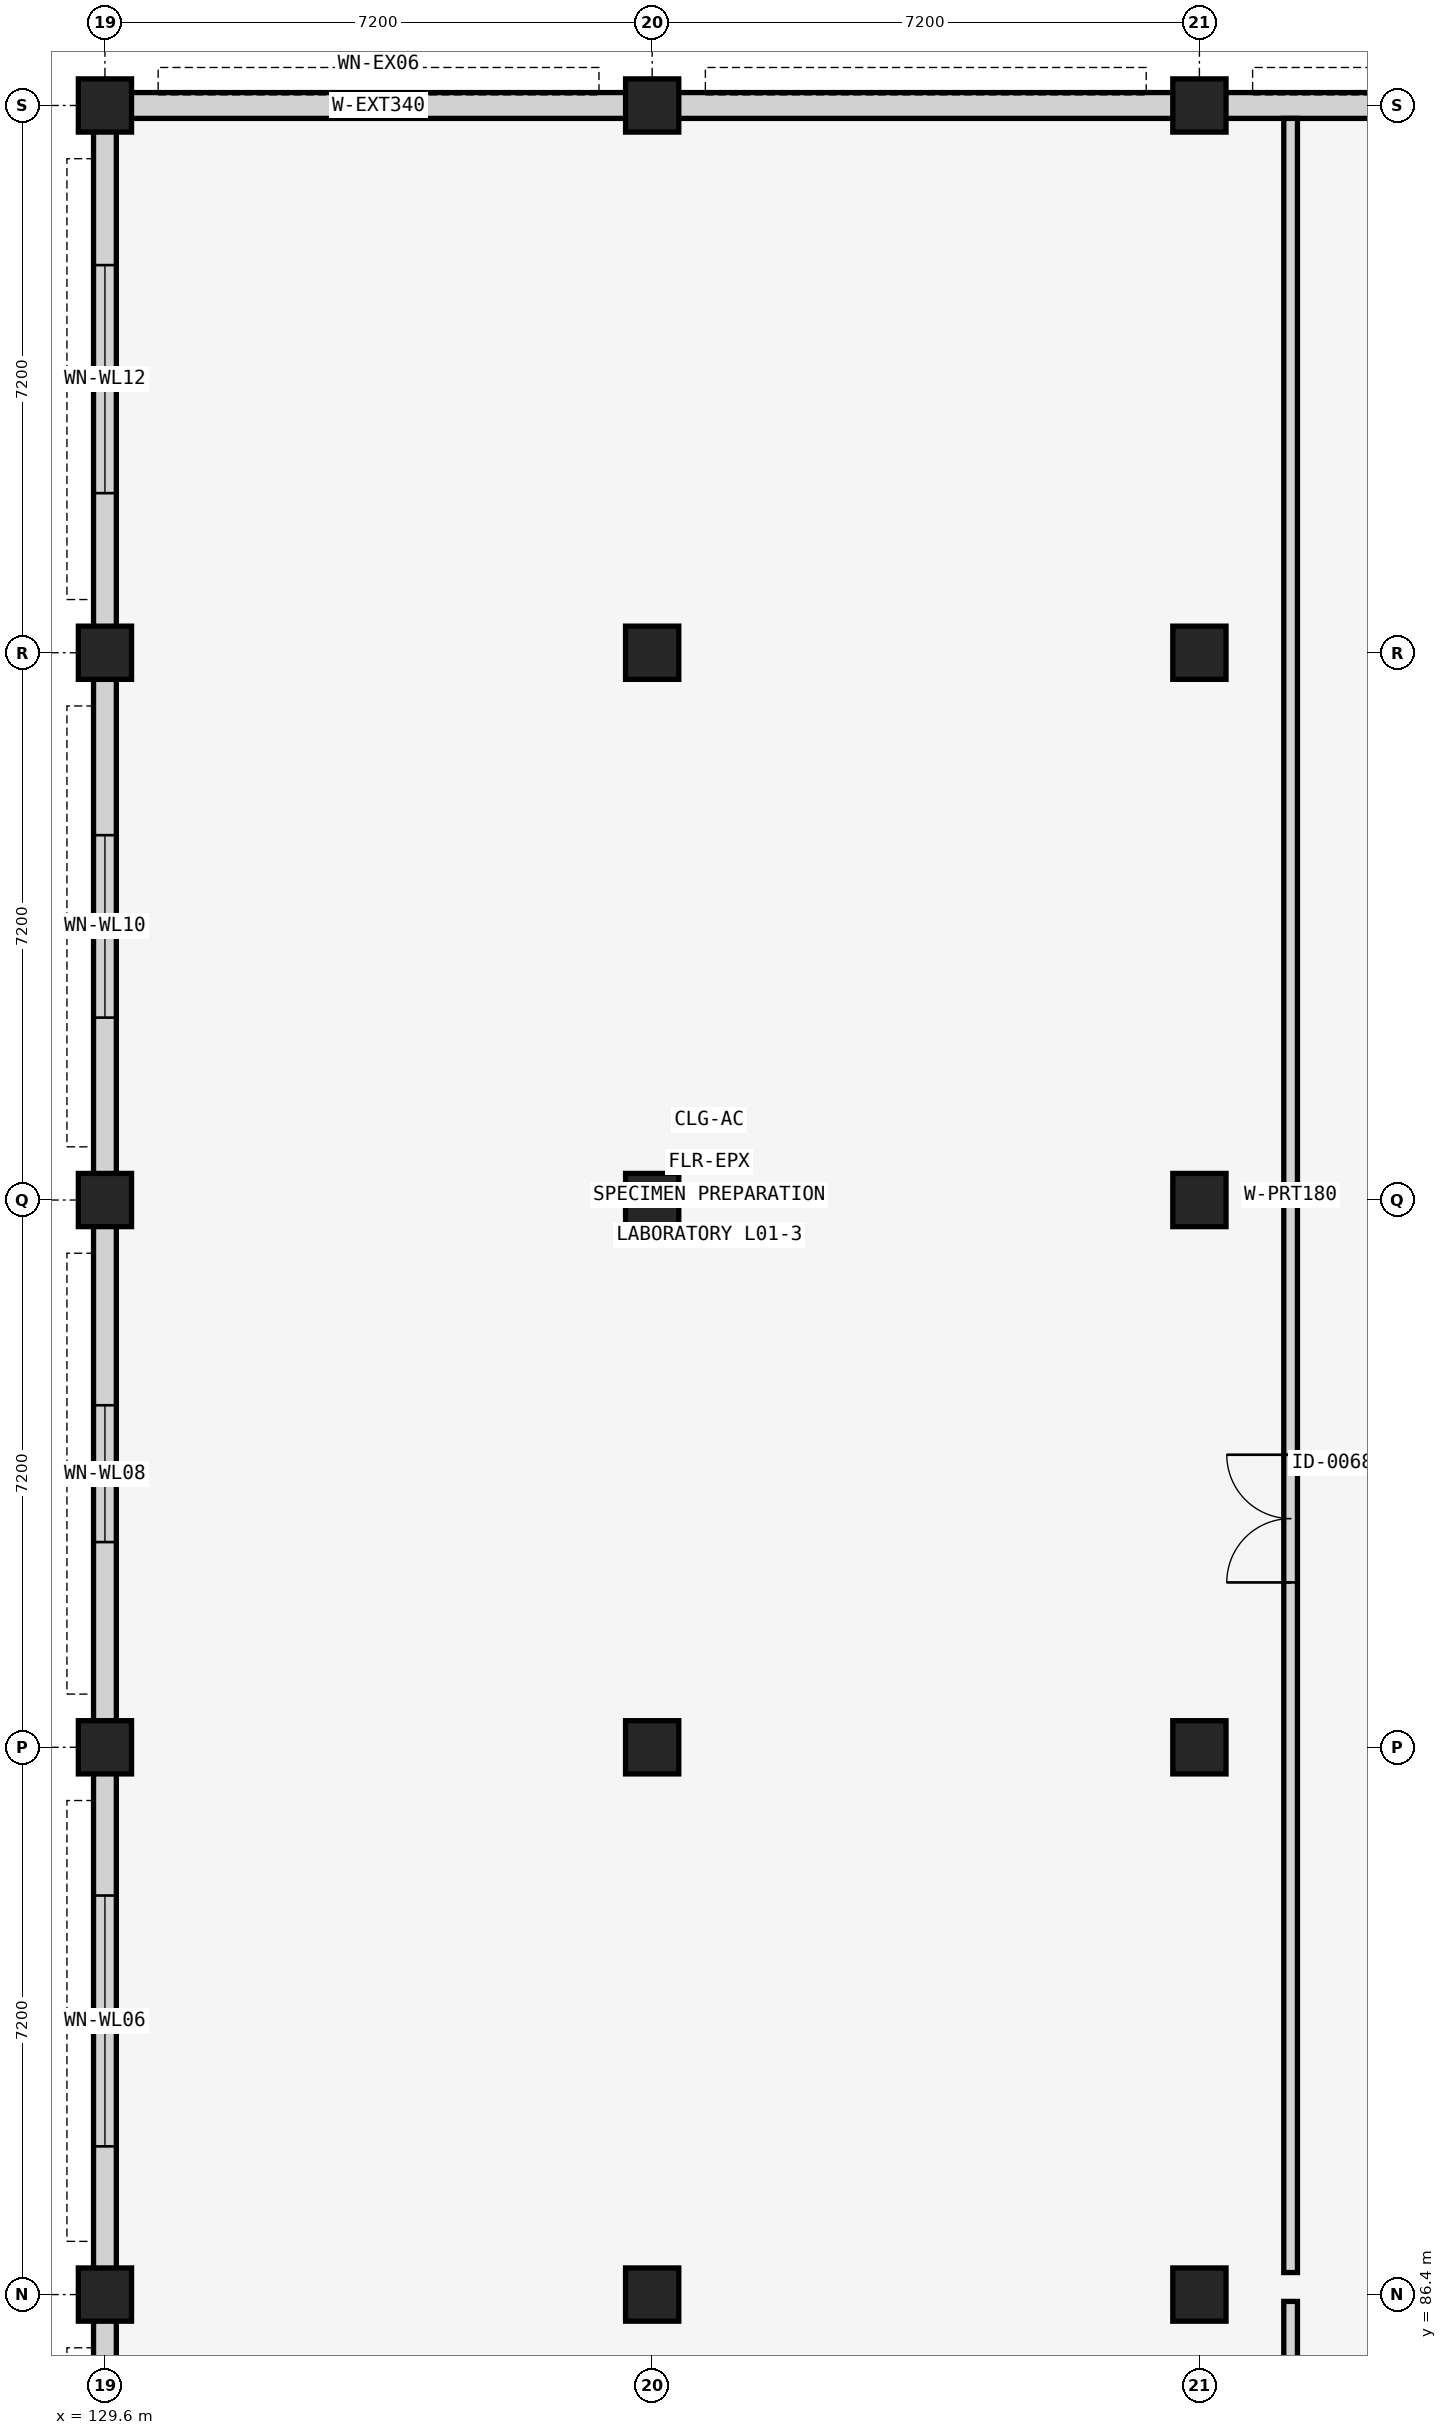
"""IFC4 building model, lengths in metres.
Left out: names, types, materials, properties, quantities, classifications, styles, units other than length and angle.
Written with IfcOpenShell. Run it as: python <this file> out.ifc"""

import sys

from ifc_helpers import new_model, si_unit, direction, frame, frame_2d, origin, origin_2d, place, context, subcontext, project, spatial, rectangle, extrude, element, fill, save


model = new_model("IFC4")
c1 = context("Model", 3, precision=1e-05, world=origin(), true_north=direction((0.0, 1.0)))
c2 = subcontext(c1, "Body", "Model", "MODEL_VIEW")
j1 = project(units=[si_unit("LENGTHUNIT", "METRE"), si_unit("PLANEANGLEUNIT", "RADIAN")], contexts=[c1])
p1 = place(None, origin())
s1 = spatial("IfcSite", under=j1, at=p1, CompositionType="ELEMENT")
p2 = place(p1, origin())
s2 = spatial("IfcBuilding", under=s1, at=p2, CompositionType="ELEMENT")
p3 = place(p2, frame((0.0, 0.0, 4.8)))
s3 = spatial("IfcBuildingStorey", under=s2, at=p3, CompositionType="ELEMENT", Elevation=4.8)
for number, where, z_axis, x_axis in (
    (1, (129.6, 86.4, 0.0), (0.0, 0.0, 1.0), (1.0, 0.0, 0.0)),
    (2, (129.6, 93.6, 0.0), (0.0, 0.0, 1.0), (1.0, 0.0, 0.0)),
    (3, (129.6, 100.8, 0.0), (0.0, 0.0, 1.0), (1.0, 0.0, 0.0)),
    (4, (129.6, 108.0, 0.0), (0.0, 0.0, 1.0), (1.0, 0.0, 0.0)),
    (5, (129.6, 115.2, 0.0), (0.0, 0.0, 1.0), (1.0, 0.0, 0.0)),
    (6, (136.8, 86.4, 0.0), (0.0, 0.0, 1.0), (1.0, 0.0, 0.0)),
    (7, (136.8, 93.6, 0.0), (0.0, 0.0, 1.0), (1.0, 0.0, 0.0)),
    (8, (136.8, 100.8, 0.0), (0.0, 0.0, 1.0), (1.0, 0.0, 0.0)),
    (9, (136.8, 108.0, 0.0), (0.0, 0.0, 1.0), (1.0, 0.0, 0.0)),
    (10, (136.8, 115.2, 0.0), (0.0, 0.0, 1.0), (1.0, 0.0, 0.0)),
    (11, (144.0, 86.4, 0.0), (0.0, 0.0, 1.0), (1.0, 0.0, 0.0)),
    (12, (144.0, 93.6, 0.0), (0.0, 0.0, 1.0), (1.0, 0.0, 0.0)),
    (13, (144.0, 100.8, 0.0), (0.0, 0.0, 1.0), (1.0, 0.0, 0.0)),
    (14, (144.0, 108.0, 0.0), (0.0, 0.0, 1.0), (1.0, 0.0, 0.0)),
    (15, (144.0, 115.2, 0.0), (0.0, 0.0, 1.0), (1.0, 0.0, 0.0)),
):
    element("IfcColumn", number, at=place(p3, frame(where, z_axis=z_axis, x_axis=x_axis)), inside=s3, PredefinedType="COLUMN", context=c2, shape_type="SweptSolid", body=[
        extrude(rectangle(XDim=0.7, YDim=0.7, at=origin_2d()), origin(), (0.0, 0.0, 1.0), 4.16),
    ])
p4 = place(p3, frame((129.94, 115.2, 0.0), z_axis=(0.0, 0.0, 1.0), x_axis=(1.0, 0.0, 0.0)))
e16 = element("IfcWall", 16, at=p4, inside=s3, PredefinedType="SOLIDWALL", context=c2, shape_type="SweptSolid", body=[
    extrude(rectangle(XDim=6.52, YDim=0.34, at=frame_2d((3.26, 0.0))), origin(), (0.0, 0.0, 1.0), 3.21),
])
p5 = place(p4, frame((2.685, 0.0, 0.95)))
e17 = element("IfcOpeningElement", 17, at=p5, cuts=e16, PredefinedType="OPENING", context=c2, shape_type="SweptSolid", body=[
    extrude(rectangle(XDim=1.15, YDim=2.0, at=frame_2d((0.575, 1.0))), frame((0.0, 0.18, 0.0), z_axis=(0.0, -1.0, 0.0), x_axis=(1.0, 0.0, 0.0)), (0.0, 0.0, 1.0), 0.36),
])
p6 = place(p3, frame((137.14, 115.2, 0.0), z_axis=(0.0, 0.0, 1.0), x_axis=(1.0, 0.0, 0.0)))
e18 = element("IfcWall", 18, at=p6, inside=s3, PredefinedType="SOLIDWALL", context=c2, shape_type="SweptSolid", body=[
    extrude(rectangle(XDim=6.52, YDim=0.34, at=frame_2d((3.26, 0.0))), origin(), (0.0, 0.0, 1.0), 3.21),
])
p7 = place(p3, frame((144.34, 115.2, 0.0), z_axis=(0.0, 0.0, 1.0), x_axis=(1.0, 0.0, 0.0)))
e19 = element("IfcWall", 19, at=p7, inside=s3, PredefinedType="SOLIDWALL", context=c2, shape_type="SweptSolid", body=[
    extrude(rectangle(XDim=6.52, YDim=0.34, at=frame_2d((3.26, 0.0))), origin(), (0.0, 0.0, 1.0), 3.21),
])
p8 = place(p7, frame((2.535, 0.0, 0.95)))
e20 = element("IfcOpeningElement", 20, at=p8, cuts=e19, PredefinedType="OPENING", context=c2, shape_type="SweptSolid", body=[
    extrude(rectangle(XDim=1.45, YDim=2.0, at=frame_2d((0.725, 1.0))), frame((0.0, 0.18, 0.0), z_axis=(0.0, -1.0, 0.0), x_axis=(1.0, 0.0, 0.0)), (0.0, 0.0, 1.0), 0.36),
])
p9 = place(p3, frame((129.6, 79.54, 0.0), z_axis=(0.0, 0.0, 1.0), x_axis=(0.0, 1.0, 0.0)))
e21 = element("IfcWall", 21, at=p9, inside=s3, PredefinedType="SOLIDWALL", context=c2, shape_type="SweptSolid", body=[
    extrude(rectangle(XDim=6.52, YDim=0.3, at=frame_2d((3.26, 0.0))), origin(), (0.0, 0.0, 1.0), 3.11),
])
p10 = place(p9, frame((1.91, 0.0, 0.85)))
e22 = element("IfcOpeningElement", 22, at=p10, cuts=e21, PredefinedType="OPENING", context=c2, shape_type="SweptSolid", body=[
    extrude(rectangle(XDim=2.7, YDim=2.1, at=frame_2d((1.35, 1.05))), frame((0.0, 0.16, 0.0), z_axis=(0.0, -1.0, 0.0), x_axis=(1.0, 0.0, 0.0)), (0.0, 0.0, 1.0), 0.32),
])
p11 = place(p3, frame((129.6, 86.74, 0.0), z_axis=(0.0, 0.0, 1.0), x_axis=(0.0, 1.0, 0.0)))
e23 = element("IfcWall", 23, at=p11, inside=s3, PredefinedType="SOLIDWALL", context=c2, shape_type="SweptSolid", body=[
    extrude(rectangle(XDim=6.52, YDim=0.3, at=frame_2d((3.26, 0.0))), origin(), (0.0, 0.0, 1.0), 3.11),
])
p12 = place(p11, frame((1.61, 0.0, 0.85)))
e24 = element("IfcOpeningElement", 24, at=p12, cuts=e23, PredefinedType="OPENING", context=c2, shape_type="SweptSolid", body=[
    extrude(rectangle(XDim=3.3, YDim=2.1, at=frame_2d((1.65, 1.05))), frame((0.0, 0.16, 0.0), z_axis=(0.0, -1.0, 0.0), x_axis=(1.0, 0.0, 0.0)), (0.0, 0.0, 1.0), 0.32),
])
p13 = place(p3, frame((129.6, 93.94, 0.0), z_axis=(0.0, 0.0, 1.0), x_axis=(0.0, 1.0, 0.0)))
e25 = element("IfcWall", 25, at=p13, inside=s3, PredefinedType="SOLIDWALL", context=c2, shape_type="SweptSolid", body=[
    extrude(rectangle(XDim=6.52, YDim=0.3, at=frame_2d((3.26, 0.0))), origin(), (0.0, 0.0, 1.0), 3.11),
])
p14 = place(p13, frame((2.36, 0.0, 0.95)))
e26 = element("IfcOpeningElement", 26, at=p14, cuts=e25, PredefinedType="OPENING", context=c2, shape_type="SweptSolid", body=[
    extrude(rectangle(XDim=1.8, YDim=1.8, at=frame_2d((0.9, 0.9))), frame((0.0, 0.16, 0.0), z_axis=(0.0, -1.0, 0.0), x_axis=(1.0, 0.0, 0.0)), (0.0, 0.0, 1.0), 0.32),
])
p15 = place(p3, frame((129.6, 101.14, 0.0), z_axis=(0.0, 0.0, 1.0), x_axis=(0.0, 1.0, 0.0)))
e27 = element("IfcWall", 27, at=p15, inside=s3, PredefinedType="SOLIDWALL", context=c2, shape_type="SweptSolid", body=[
    extrude(rectangle(XDim=6.52, YDim=0.3, at=frame_2d((3.26, 0.0))), origin(), (0.0, 0.0, 1.0), 3.11),
])
p16 = place(p15, frame((2.06, 0.0, 0.95)))
e28 = element("IfcOpeningElement", 28, at=p16, cuts=e27, PredefinedType="OPENING", context=c2, shape_type="SweptSolid", body=[
    extrude(rectangle(XDim=2.4, YDim=1.8, at=frame_2d((1.2, 0.9))), frame((0.0, 0.16, 0.0), z_axis=(0.0, -1.0, 0.0), x_axis=(1.0, 0.0, 0.0)), (0.0, 0.0, 1.0), 0.32),
])
p17 = place(p3, frame((129.6, 108.34, 0.0), z_axis=(0.0, 0.0, 1.0), x_axis=(0.0, 1.0, 0.0)))
e29 = element("IfcWall", 29, at=p17, inside=s3, PredefinedType="SOLIDWALL", context=c2, shape_type="SweptSolid", body=[
    extrude(rectangle(XDim=6.52, YDim=0.3, at=frame_2d((3.26, 0.0))), origin(), (0.0, 0.0, 1.0), 3.11),
])
p18 = place(p17, frame((1.76, 0.0, 0.95)))
e30 = element("IfcOpeningElement", 30, at=p18, cuts=e29, PredefinedType="OPENING", context=c2, shape_type="SweptSolid", body=[
    extrude(rectangle(XDim=3.0, YDim=1.8, at=frame_2d((1.5, 0.9))), frame((0.0, 0.16, 0.0), z_axis=(0.0, -1.0, 0.0), x_axis=(1.0, 0.0, 0.0)), (0.0, 0.0, 1.0), 0.32),
])
p19 = place(p3, frame((145.2, 65.09, 0.0), z_axis=(0.0, 0.0, 1.0), x_axis=(0.0, 1.0, 0.0)))
e31 = element("IfcWall", 31, at=p19, inside=s3, PredefinedType="PARTITIONING", context=c2, shape_type="SweptSolid", body=[
    extrude(rectangle(XDim=21.22, YDim=0.18, at=frame_2d((10.61, 0.0))), origin(), (0.0, 0.0, 1.0), 3.11),
])
p20 = place(p19, frame((9.795, 0.0, 0.0)))
e32 = element("IfcOpeningElement", 32, at=p20, cuts=e31, PredefinedType="OPENING", context=c2, shape_type="SweptSolid", body=[
    extrude(rectangle(XDim=1.63, YDim=2.22, at=frame_2d((0.815, 1.11))), frame((0.0, 0.1, 0.0), z_axis=(0.0, -1.0, 0.0), x_axis=(1.0, 0.0, 0.0)), (0.0, 0.0, 1.0), 0.2),
])
p21 = place(p3, frame((145.2, 86.69, 0.0), z_axis=(0.0, 0.0, 1.0), x_axis=(0.0, 1.0, 0.0)))
e33 = element("IfcWall", 33, at=p21, inside=s3, PredefinedType="PARTITIONING", context=c2, shape_type="SweptSolid", body=[
    extrude(rectangle(XDim=28.34, YDim=0.18, at=frame_2d((14.17, 0.0))), origin(), (0.0, 0.0, 1.0), 3.11),
])
p22 = place(p21, frame((9.079, 0.0, 0.0)))
e34 = element("IfcOpeningElement", 34, at=p22, cuts=e33, PredefinedType="OPENING", context=c2, shape_type="SweptSolid", body=[
    extrude(rectangle(XDim=1.68, YDim=2.22, at=frame_2d((0.84, 1.11))), frame((0.0, 0.1, 0.0), z_axis=(0.0, -1.0, 0.0), x_axis=(1.0, 0.0, 0.0)), (0.0, 0.0, 1.0), 0.2),
])
p23 = place(p5, origin())
e35 = element("IfcWindow", 35, at=p23, inside=s3, PartitioningType="SINGLE_PANEL", PredefinedType="WINDOW", context=c2, shape_type="SweptSolid", body=[
    extrude(rectangle(XDim=1.15, YDim=2.0, at=frame_2d((0.575, 1.0))), frame((0.0, 0.03, 0.0), z_axis=(0.0, -1.0, 0.0), x_axis=(1.0, 0.0, 0.0)), (0.0, 0.0, 1.0), 0.06),
])
fill(e17, e35)
p24 = place(p12, origin())
e36 = element("IfcWindow", 36, at=p24, inside=s3, PartitioningType="SINGLE_PANEL", PredefinedType="WINDOW", context=c2, shape_type="SweptSolid", body=[
    extrude(rectangle(XDim=3.3, YDim=2.1, at=frame_2d((1.65, 1.05))), frame((0.0, 0.03, 0.0), z_axis=(0.0, -1.0, 0.0), x_axis=(1.0, 0.0, 0.0)), (0.0, 0.0, 1.0), 0.06),
])
fill(e24, e36)
p25 = place(p14, origin())
e37 = element("IfcWindow", 37, at=p25, inside=s3, PartitioningType="SINGLE_PANEL", PredefinedType="WINDOW", context=c2, shape_type="SweptSolid", body=[
    extrude(rectangle(XDim=1.8, YDim=1.8, at=frame_2d((0.9, 0.9))), frame((0.0, 0.03, 0.0), z_axis=(0.0, -1.0, 0.0), x_axis=(1.0, 0.0, 0.0)), (0.0, 0.0, 1.0), 0.06),
])
fill(e26, e37)
p26 = place(p16, origin())
e38 = element("IfcWindow", 38, at=p26, inside=s3, PartitioningType="SINGLE_PANEL", PredefinedType="WINDOW", context=c2, shape_type="SweptSolid", body=[
    extrude(rectangle(XDim=2.4, YDim=1.8, at=frame_2d((1.2, 0.9))), frame((0.0, 0.03, 0.0), z_axis=(0.0, -1.0, 0.0), x_axis=(1.0, 0.0, 0.0)), (0.0, 0.0, 1.0), 0.06),
])
fill(e28, e38)
p27 = place(p18, origin())
e39 = element("IfcWindow", 39, at=p27, inside=s3, PartitioningType="SINGLE_PANEL", PredefinedType="WINDOW", context=c2, shape_type="SweptSolid", body=[
    extrude(rectangle(XDim=3.0, YDim=1.8, at=frame_2d((1.5, 0.9))), frame((0.0, 0.03, 0.0), z_axis=(0.0, -1.0, 0.0), x_axis=(1.0, 0.0, 0.0)), (0.0, 0.0, 1.0), 0.06),
])
fill(e30, e39)
p28 = place(p22, origin())
e40 = element("IfcDoor", 40, at=p28, inside=s3, OperationType="DOUBLE_DOOR_SINGLE_SWING", PredefinedType="DOOR", context=c2, shape_type="SweptSolid", body=[
    extrude(rectangle(XDim=1.68, YDim=2.22, at=frame_2d((0.84, 1.11))), frame((0.0, 0.025, 0.0), z_axis=(0.0, -1.0, 0.0), x_axis=(1.0, 0.0, 0.0)), (0.0, 0.0, 1.0), 0.05),
])
fill(e34, e40)
save(model, sys.argv[1])
